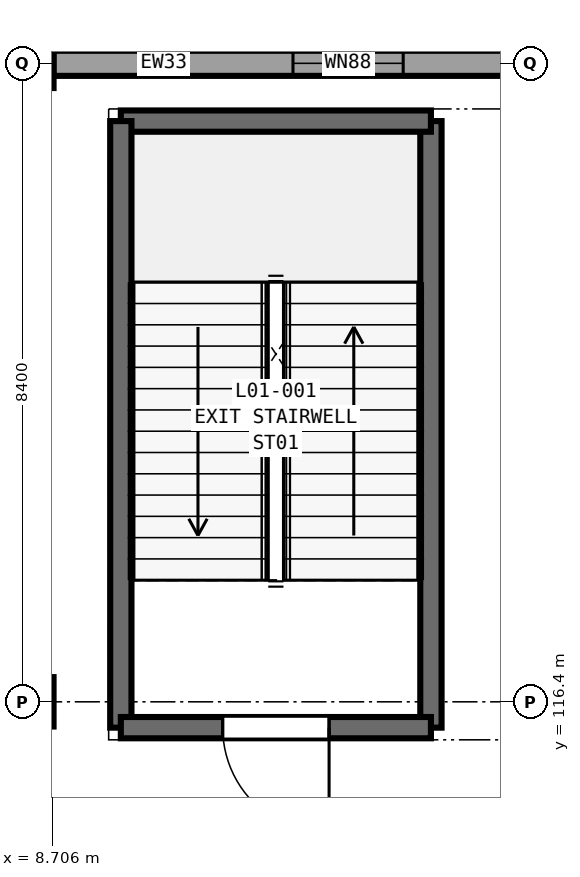
"""IFC4 building model, lengths in metres.
Left out: names, types, materials, properties, quantities, classifications, styles, units other than length and angle.
Written with IfcOpenShell. Run it as: python <this file> out.ifc"""

import sys

from ifc_helpers import new_model, si_unit, direction, frame, frame_2d, origin, origin_2d, place, context, subcontext, project, spatial, rectangle, extrude, element, fill, save


model = new_model("IFC4")
c1 = context("Model", 3, precision=1e-05, world=origin(), true_north=direction((0.0, 1.0)))
c2 = subcontext(c1, "Body", "Model", "MODEL_VIEW")
j1 = project(units=[si_unit("LENGTHUNIT", "METRE"), si_unit("PLANEANGLEUNIT", "RADIAN")], contexts=[c1])
p1 = place(None, origin())
s1 = spatial("IfcSite", under=j1, at=p1, CompositionType="ELEMENT")
p2 = place(p1, origin())
s2 = spatial("IfcBuilding", under=s1, at=p2, CompositionType="ELEMENT")
p3 = place(p2, frame((0.0, 0.0, 5.4)))
s3 = spatial("IfcBuildingStorey", under=s2, at=p3, CompositionType="ELEMENT", Elevation=5.4)
for number, where, z_axis, x_axis in (
    (1, (8.4, 116.4, 0.0), (0.0, 0.0, 1.0), (1.0, 0.0, 0.0)),
    (2, (8.4, 124.8, 0.0), (0.0, 0.0, 1.0), (1.0, 0.0, 0.0)),
):
    element("IfcColumn", number, at=place(p3, frame(where, z_axis=z_axis, x_axis=x_axis)), inside=s3, PredefinedType="COLUMN", context=c2, shape_type="SweptSolid", body=[
        extrude(rectangle(XDim=0.65, YDim=0.65, at=origin_2d()), origin(), (0.0, 0.0, 1.0), 5.4),
    ])
p4 = place(p3, frame((8.723, 124.8, 0.0), z_axis=(0.0, 0.0, 1.0), x_axis=(1.0, 0.0, 0.0)))
e3 = element("IfcWall", 3, at=p4, inside=s3, PredefinedType="SOLIDWALL", context=c2, shape_type="SweptSolid", body=[
    extrude(rectangle(XDim=7.754, YDim=0.33, at=frame_2d((3.877, 0.0))), origin(), (0.0, 0.0, 1.0), 4.68),
])
p5 = place(p4, frame((3.152, 0.0, 0.9)))
e4 = element("IfcOpeningElement", 4, at=p5, cuts=e3, PredefinedType="OPENING", context=c2, shape_type="SweptSolid", body=[
    extrude(rectangle(XDim=1.45, YDim=1.75, at=frame_2d((0.725, 0.875))), frame((0.0, 0.175, 0.0), z_axis=(0.0, -1.0, 0.0), x_axis=(1.0, 0.0, 0.0)), (0.0, 0.0, 1.0), 0.35),
])
p6 = place(p3, frame((13.69, 116.06, 0.0), z_axis=(0.0, 0.0, 1.0), x_axis=(0.0, 1.0, 0.0)))
e5 = element("IfcWall", 5, at=p6, inside=s3, PredefinedType="SHEAR", context=c2, shape_type="SweptSolid", body=[
    extrude(rectangle(XDim=7.98, YDim=0.28, at=frame_2d((3.99, 0.0))), origin(), (0.0, 0.0, 1.0), 5.4),
])
p7 = place(p3, frame((13.69, 124.04, 0.0), z_axis=(0.0, 0.0, 1.0), x_axis=(-1.0, 0.0, 0.0)))
e6 = element("IfcWall", 6, at=p7, inside=s3, PredefinedType="SHEAR", context=c2, shape_type="SweptSolid", body=[
    extrude(rectangle(XDim=4.08, YDim=0.28, at=frame_2d((2.04, 0.0))), origin(), (0.0, 0.0, 1.0), 5.4),
])
p8 = place(p3, frame((9.61, 124.04, 0.0), z_axis=(0.0, 0.0, 1.0), x_axis=(0.0, -1.0, 0.0)))
e7 = element("IfcWall", 7, at=p8, inside=s3, PredefinedType="SHEAR", context=c2, shape_type="SweptSolid", body=[
    extrude(rectangle(XDim=7.98, YDim=0.28, at=frame_2d((3.99, 0.0))), origin(), (0.0, 0.0, 1.0), 5.4),
])
p9 = place(p3, frame((9.61, 116.06, 0.0), z_axis=(0.0, 0.0, 1.0), x_axis=(1.0, 0.0, 0.0)))
e8 = element("IfcWall", 8, at=p9, inside=s3, PredefinedType="SHEAR", context=c2, shape_type="SweptSolid", body=[
    extrude(rectangle(XDim=4.08, YDim=0.28, at=frame_2d((2.04, 0.0))), origin(), (0.0, 0.0, 1.0), 5.4),
])
p10 = place(p9, frame((1.34, 0.0, 0.0)))
e9 = element("IfcOpeningElement", 9, at=p10, cuts=e8, PredefinedType="OPENING", context=c2, shape_type="SweptSolid", body=[
    extrude(rectangle(XDim=1.4, YDim=2.2, at=frame_2d((0.7, 1.1))), frame((0.0, 0.15, 0.0), z_axis=(0.0, -1.0, 0.0), x_axis=(1.0, 0.0, 0.0)), (0.0, 0.0, 1.0), 0.3),
])
p11 = place(p5, origin())
e10 = element("IfcWindow", 10, at=p11, inside=s3, PartitioningType="SINGLE_PANEL", PredefinedType="WINDOW", context=c2, shape_type="SweptSolid", body=[
    extrude(rectangle(XDim=1.45, YDim=1.75, at=frame_2d((0.725, 0.875))), frame((0.0, 0.03, 0.0), z_axis=(0.0, -1.0, 0.0), x_axis=(1.0, 0.0, 0.0)), (0.0, 0.0, 1.0), 0.06),
])
fill(e4, e10)
p12 = place(p10, frame((1.4, 0.0, 0.0), z_axis=(0.0, 0.0, 1.0), x_axis=(-1.0, 0.0, 0.0)))
e11 = element("IfcDoor", 11, at=p12, inside=s3, OperationType="SINGLE_SWING_LEFT", PredefinedType="DOOR", context=c2, shape_type="SweptSolid", body=[
    extrude(rectangle(XDim=1.4, YDim=2.2, at=frame_2d((0.7, 1.1))), frame((0.0, 0.025, 0.0), z_axis=(0.0, -1.0, 0.0), x_axis=(1.0, 0.0, 0.0)), (0.0, 0.0, 1.0), 0.05),
])
fill(e9, e11)
save(model, sys.argv[1])
